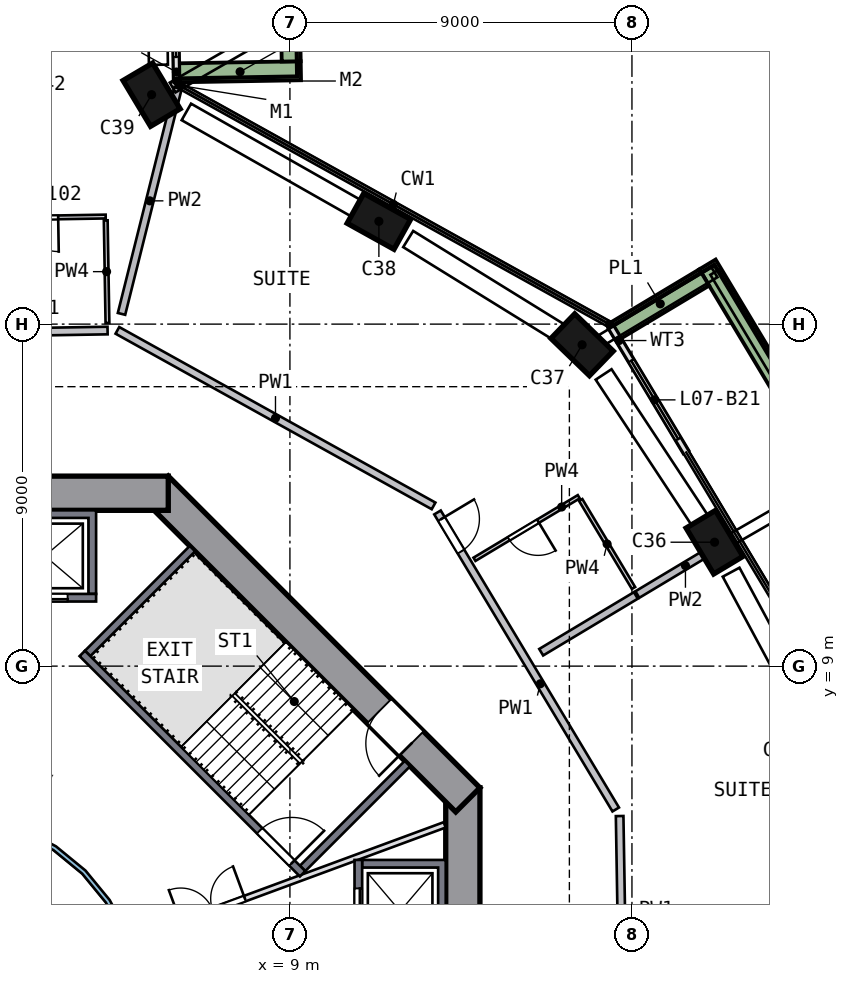
"""IFC4 building model, lengths in metres.
Left out: names, types, materials, properties, quantities, classifications, styles, units other than length and angle.
Written with IfcOpenShell. Run it as: python <this file> out.ifc"""

import sys

from ifc_helpers import new_model, si_unit, direction, frame, frame_2d, origin, origin_2d, place, context, subcontext, project, spatial, polyline, rectangle, outline, extrude, element, fill, save


model = new_model("IFC4")
c1 = context("Model", 3, precision=1e-05, world=origin(), true_north=direction((0.0, 1.0)))
c2 = subcontext(c1, "Body", "Model", "MODEL_VIEW")
j1 = project(units=[si_unit("LENGTHUNIT", "METRE"), si_unit("PLANEANGLEUNIT", "RADIAN")], contexts=[c1])
p1 = place(None, origin())
s1 = spatial("IfcSite", under=j1, at=p1, CompositionType="ELEMENT")
p2 = place(p1, origin())
s2 = spatial("IfcBuilding", under=s1, at=p2, CompositionType="ELEMENT")
p3 = place(p2, frame((0.0, 0.0, 39.0)))
s3 = spatial("IfcBuildingStorey", under=s2, at=p3, CompositionType="ELEMENT", Elevation=39.0)
p4 = place(p3, frame((20.245, 12.145, 0.0), z_axis=(-0.058634587, 0.095823061, 0.993669928), x_axis=(-0.511428467, 0.851951728, -0.112335108)))
e1 = element("IfcColumn", 1, at=p4, inside=s3, PredefinedType="COLUMN", context=c2, shape_type="SweptSolid", body=[
    extrude(rectangle(XDim=1.4, YDim=0.9, at=origin_2d()), origin(), (0.0, 0.0, 1.0), 3.21),
])
p5 = place(p3, frame((16.789, 17.361, 0.0), z_axis=(-0.08325007, 0.079220615, 0.993374813), x_axis=(0.713782466, -0.690875568, 0.114915364)))
e2 = element("IfcColumn", 2, at=p5, inside=s3, PredefinedType="COLUMN", context=c2, shape_type="SweptSolid", body=[
    extrude(rectangle(XDim=1.4, YDim=0.9, at=origin_2d()), origin(), (0.0, 0.0, 1.0), 3.211),
])
p6 = place(p3, frame((11.46, 20.64, 0.0), z_axis=(-0.098637311, 0.053691551, 0.99367394), x_axis=(-0.868690978, 0.482457023, -0.112299622)))
e3 = element("IfcColumn", 3, at=p6, inside=s3, PredefinedType="COLUMN", context=c2, shape_type="SweptSolid", body=[
    extrude(rectangle(XDim=1.4, YDim=0.9, at=origin_2d()), origin(), (0.0, 0.0, 1.0), 3.21),
])
p7 = place(p3, frame((5.499, 24.007, 0.0), z_axis=(-0.114391427, 0.025234521, 0.99311521), x_axis=(0.506584299, -0.858455681, 0.080163528)))
e4 = element("IfcColumn", 4, at=p7, inside=s3, PredefinedType="COLUMN", context=c2, shape_type="SweptSolid", body=[
    extrude(rectangle(XDim=1.4, YDim=0.9, at=origin_2d()), origin(), (0.0, 0.0, 1.0), 3.212),
])
p8 = place(p3, frame((13.55, -5.799, 0.0), z_axis=(0.0, 0.0, 1.0), x_axis=(0.0, 1.0, 0.0)))
e5 = element("IfcWall", 5, at=p8, inside=s3, PredefinedType="SHEAR", context=c2, shape_type="SweptSolid", body=[
    extrude(rectangle(XDim=11.598, YDim=0.9, at=frame_2d((5.799, 0.0))), origin(), (0.0, 0.0, 1.0), 3.5),
])
p9 = place(p8, frame((4.899, 0.0, 0.0)))
e6 = element("IfcOpeningElement", 6, at=p9, cuts=e5, PredefinedType="OPENING", context=c2, shape_type="SweptSolid", body=[
    extrude(rectangle(XDim=1.8, YDim=2.1, at=frame_2d((0.9, 1.05))), frame((0.0, 0.46, 0.0), z_axis=(0.0, -1.0, 0.0), x_axis=(1.0, 0.0, 0.0)), (0.0, 0.0, 1.0), 0.92),
])
p10 = place(p3, frame((13.682, 5.481, 0.0), z_axis=(0.0, 0.0, 1.0), x_axis=(-0.707106781, 0.707106781, 0.0)))
e7 = element("IfcWall", 7, at=p10, inside=s3, PredefinedType="SHEAR", context=c2, shape_type="SweptSolid", body=[
    extrude(rectangle(XDim=11.598, YDim=0.9, at=frame_2d((5.799, 0.0))), origin(), (0.0, 0.0, 1.0), 3.5),
])
p11 = place(p10, frame((2.099, 0.0, 0.0)))
e8 = element("IfcOpeningElement", 8, at=p11, cuts=e7, PredefinedType="OPENING", context=c2, shape_type="SweptSolid", body=[
    extrude(rectangle(XDim=1.2, YDim=2.1, at=frame_2d((0.6, 1.05))), frame((0.0, 0.46, 0.0), z_axis=(0.0, -1.0, 0.0), x_axis=(1.0, 0.0, 0.0)), (0.0, 0.0, 1.0), 0.92),
])
p12 = place(p3, frame((5.799, 13.55, 0.0), z_axis=(0.0, 0.0, 1.0), x_axis=(-1.0, 0.0, 0.0)))
e9 = element("IfcWall", 9, at=p12, inside=s3, PredefinedType="SHEAR", context=c2, shape_type="SweptSolid", body=[
    extrude(rectangle(XDim=11.598, YDim=0.9, at=frame_2d((5.799, 0.0))), origin(), (0.0, 0.0, 1.0), 3.5),
])
p13 = place(p12, frame((4.899, 0.0, 0.0)))
e10 = element("IfcOpeningElement", 10, at=p13, cuts=e9, PredefinedType="OPENING", context=c2, shape_type="SweptSolid", body=[
    extrude(rectangle(XDim=1.8, YDim=2.1, at=frame_2d((0.9, 1.05))), frame((0.0, 0.46, 0.0), z_axis=(0.0, -1.0, 0.0), x_axis=(1.0, 0.0, 0.0)), (0.0, 0.0, 1.0), 0.92),
])
p14 = place(p3, frame((6.017, 24.433, 0.0), z_axis=(0.0, 0.0, 1.0), x_axis=(-0.016793497, 0.999858979, 0.0)))
e11 = element("IfcWall", 11, at=p14, inside=s3, PredefinedType="SOLIDWALL", context=c2, shape_type="SweptSolid", body=[
    extrude(rectangle(XDim=3.402, YDim=0.15, at=frame_2d((1.701, 0.0))), origin(), (0.0, 0.0, 1.0), 2.425),
])
p15 = place(p14, frame((0.602, 0.0, 0.0)))
e12 = element("IfcOpeningElement", 12, at=p15, cuts=e11, PredefinedType="OPENING", context=c2, shape_type="SweptSolid", body=[
    extrude(rectangle(XDim=2.4, YDim=2.4, at=frame_2d((1.2, 1.2))), frame((0.0, 0.085, 0.0), z_axis=(0.0, -1.0, 0.0), x_axis=(1.0, 0.0, 0.0)), (0.0, 0.0, 1.0), 0.17),
])
p16 = place(p3, frame((19.422, 14.635, 0.0), z_axis=(0.0, 0.0, 1.0), x_axis=(-0.514430336, 0.857532174, 0.0)))
e13 = element("IfcWall", 13, at=p16, inside=s3, PredefinedType="SOLIDWALL", context=c2, shape_type="SweptSolid", body=[
    extrude(rectangle(XDim=3.842, YDim=0.15, at=frame_2d((1.921, 0.0))), origin(), (0.0, 0.0, 1.0), 2.425),
])
p17 = place(p16, frame((0.4, 0.0, 0.0)))
e14 = element("IfcOpeningElement", 14, at=p17, cuts=e13, PredefinedType="OPENING", context=c2, shape_type="SweptSolid", body=[
    extrude(rectangle(XDim=2.4, YDim=2.4, at=frame_2d((1.2, 1.2))), frame((0.0, 0.085, 0.0), z_axis=(0.0, -1.0, 0.0), x_axis=(1.0, 0.0, 0.0)), (0.0, 0.0, 1.0), 0.17),
])
p18 = place(p3, frame((27.048, 7.803, 0.0), z_axis=(0.0, 0.0, 1.0), x_axis=(-0.514432966, 0.857530596, 0.0)))
e15 = element("IfcWall", 15, at=p18, inside=s3, PredefinedType="SOLIDWALL", context=c2, shape_type="SweptSolid", body=[
    extrude(rectangle(XDim=13.723, YDim=0.5, at=frame_2d((6.862, 0.0))), origin(), (0.0, 0.0, 1.0), 0.7),
])
p19 = place(p3, frame((19.902, 19.228, 0.0), z_axis=(0.0, 0.0, 1.0), x_axis=(-0.857532831, -0.514429241, 0.0)))
e16 = element("IfcWall", 16, at=p19, inside=s3, PredefinedType="SOLIDWALL", context=c2, shape_type="SweptSolid", body=[
    extrude(rectangle(XDim=2.699, YDim=0.5, at=frame_2d((1.35, 0.0))), origin(), (0.0, 0.0, 1.0), 0.7),
])
p20 = place(p3, frame((6.089, 24.614, 0.0), z_axis=(0.0, 0.0, 1.0), x_axis=(0.999859055, 0.016788963, 0.0)))
e17 = element("IfcWall", 17, at=p20, inside=s3, PredefinedType="SOLIDWALL", context=c2, shape_type="SweptSolid", body=[
    extrude(rectangle(XDim=3.199, YDim=0.5, at=frame_2d((1.6, 0.0))), origin(), (0.0, 0.0, 1.0), 0.7),
])
p21 = place(p3, frame((9.034, 24.913, 0.0), z_axis=(0.0, 0.0, 1.0), x_axis=(-0.016763742, 0.999859479, 0.0)))
e18 = element("IfcWall", 18, at=p21, inside=s3, PredefinedType="SOLIDWALL", context=c2, shape_type="SweptSolid", body=[
    extrude(rectangle(XDim=16.617, YDim=0.5, at=frame_2d((8.309, 0.0))), origin(), (0.0, 0.0, 1.0), 0.7),
])
p22 = place(p3, origin())
e19 = element("IfcWall", 19, at=p22, inside=s3, PredefinedType="SOLIDWALL", context=c2, shape_type="SweptSolid", body=[
    extrude(outline(polyline([(13.1, 3.9), (13.1, 1.2), (10.9, 1.2), (10.9, 1.4), (12.9, 1.4), (12.9, 3.7), (10.9, 3.7), (10.9, 3.9), (13.1, 3.9)])), origin(), (0.0, 0.0, 1.0), 3.19),
])
p23 = place(p3, frame((10.8, 1.2, 0.0), z_axis=(0.0, 0.0, 1.0), x_axis=(0.0, 1.0, 0.0)))
e20 = element("IfcWall", 20, at=p23, inside=s3, PredefinedType="SOLIDWALL", context=c2, shape_type="SweptSolid", body=[
    extrude(rectangle(XDim=2.7, YDim=0.2, at=frame_2d((1.35, 0.0))), origin(), (0.0, 0.0, 1.0), 3.19),
])
p24 = place(p23, frame((0.75, 0.0, 0.0)))
e21 = element("IfcOpeningElement", 21, at=p24, cuts=e20, PredefinedType="OPENING", context=c2, shape_type="SweptSolid", body=[
    extrude(rectangle(XDim=1.2, YDim=2.1, at=frame_2d((0.6, 1.05))), frame((0.0, 0.11, 0.0), z_axis=(0.0, -1.0, 0.0), x_axis=(1.0, 0.0, 0.0)), (0.0, 0.0, 1.0), 0.22),
])
p25 = place(p3, origin())
e22 = element("IfcWall", 22, at=p25, inside=s3, PredefinedType="SOLIDWALL", context=c2, shape_type="SweptSolid", body=[
    extrude(outline(polyline([(3.9, 13.1), (3.9, 10.9), (3.7, 10.9), (3.7, 12.9), (1.4, 12.9), (1.4, 10.9), (1.2, 10.9), (1.2, 13.1), (3.9, 13.1)])), origin(), (0.0, 0.0, 1.0), 3.19),
])
p26 = place(p3, frame((1.2, 10.8, 0.0), z_axis=(0.0, 0.0, 1.0), x_axis=(1.0, 0.0, 0.0)))
e23 = element("IfcWall", 23, at=p26, inside=s3, PredefinedType="SOLIDWALL", context=c2, shape_type="SweptSolid", body=[
    extrude(rectangle(XDim=2.7, YDim=0.2, at=frame_2d((1.35, 0.0))), origin(), (0.0, 0.0, 1.0), 3.19),
])
p27 = place(p26, frame((0.75, 0.0, 0.0)))
e24 = element("IfcOpeningElement", 24, at=p27, cuts=e23, PredefinedType="OPENING", context=c2, shape_type="SweptSolid", body=[
    extrude(rectangle(XDim=1.2, YDim=2.1, at=frame_2d((0.6, 1.05))), frame((0.0, 0.11, 0.0), z_axis=(0.0, -1.0, 0.0), x_axis=(1.0, 0.0, 0.0)), (0.0, 0.0, 1.0), 0.22),
])
p28 = place(p3, frame((3.535, 9.334, 0.0), z_axis=(0.0, 0.0, 1.0), x_axis=(0.707106781, -0.707106781, 0.0)))
e25 = element("IfcWall", 25, at=p28, inside=s3, PredefinedType="SOLIDWALL", context=c2, shape_type="SweptSolid", body=[
    extrude(rectangle(XDim=8.2, YDim=0.2, at=frame_2d((4.1, 0.0))), origin(), (0.0, 0.0, 1.0), 3.19),
])
p29 = place(p28, frame((6.6, 0.0, 0.0)))
e26 = element("IfcOpeningElement", 26, at=p29, cuts=e25, PredefinedType="OPENING", context=c2, shape_type="SweptSolid", body=[
    extrude(rectangle(XDim=1.2, YDim=2.1, at=frame_2d((0.6, 1.05))), frame((0.0, 0.11, 0.0), z_axis=(0.0, -1.0, 0.0), x_axis=(1.0, 0.0, 0.0)), (0.0, 0.0, 1.0), 0.22),
])
for number, where, z_axis, x_axis in (
    (27, (9.334, 3.677, 0.0), (0.0, 0.0, 1.0), (0.707, 0.707, 0.0)),
    (28, (3.677, 9.334, 0.0), (0.0, 0.0, 1.0), (0.707, 0.707, 0.0)),
):
    element("IfcWall", number, at=place(p3, frame(where, z_axis=z_axis, x_axis=x_axis)), inside=s3, PredefinedType="SOLIDWALL", context=c2, shape_type="SweptSolid", body=[
        extrude(rectangle(XDim=3.9, YDim=0.2, at=frame_2d((1.95, 0.0))), origin(), (0.0, 0.0, 1.0), 3.19),
    ])
p30 = place(p3, frame((4.813, 1.776, 0.0), z_axis=(0.0, 0.0, 1.0), x_axis=(0.93819293, 0.346112737, 0.0)))
e29 = element("IfcWall", 29, at=p30, inside=s3, PredefinedType="PARTITIONING", context=c2, shape_type="SweptSolid", body=[
    extrude(rectangle(XDim=8.803, YDim=0.15, at=frame_2d((4.402, 0.0))), origin(), (0.0, 0.0, 1.0), 3.19),
])
p31 = place(p30, frame((1.4, 0.0, 0.0)))
e30 = element("IfcOpeningElement", 30, at=p31, cuts=e29, PredefinedType="OPENING", context=c2, shape_type="SweptSolid", body=[
    extrude(rectangle(XDim=1.8, YDim=2.1, at=frame_2d((0.9, 1.05))), frame((0.0, 0.085, 0.0), z_axis=(0.0, -1.0, 0.0), x_axis=(1.0, 0.0, 0.0)), (0.0, 0.0, 1.0), 0.17),
])
p32 = place(p3, origin())
e31 = element("IfcWall", 31, at=p32, inside=s3, PredefinedType="SOLIDWALL", context=c2, shape_type="SweptSolid", body=[
    extrude(outline(polyline([(5.021, -0.999), (4.73, -1.959), (4.257, -2.844), (3.62, -3.62), (2.844, -4.257), (1.959, -4.73), (0.999, -5.021), (0.0, -5.12), (-0.999, -5.021), (-1.959, -4.73), (-2.844, -4.257), (-3.62, -3.62), (-4.257, -2.844), (-4.73, -1.959), (-5.021, -0.999), (-5.12, 0.0), (-5.021, 0.999), (-4.73, 1.959), (-4.257, 2.844), (-3.62, 3.62), (-2.844, 4.257), (-1.959, 4.73), (-0.999, 5.021), (0.0, 5.12), (0.999, 5.021), (1.959, 4.73), (2.844, 4.257), (3.62, 3.62), (4.257, 2.844), (4.73, 1.959), (5.021, 0.999), (5.12, 0.0), (5.021, -0.999)]), holes=[polyline([(4.904, 0.976), (4.619, 1.913), (4.157, 2.778), (3.535, 3.535), (2.778, 4.157), (1.913, 4.619), (0.976, 4.904), (0.0, 5.0), (-0.976, 4.904), (-1.913, 4.619), (-2.778, 4.157), (-3.535, 3.535), (-4.157, 2.778), (-4.619, 1.913), (-4.904, 0.976), (-5.0, 0.0), (-4.904, -0.976), (-4.619, -1.913), (-4.157, -2.778), (-3.535, -3.535), (-2.778, -4.157), (-1.913, -4.619), (-0.976, -4.904), (0.0, -5.0), (0.976, -4.904), (1.913, -4.619), (2.778, -4.157), (3.535, -3.535), (4.157, -2.778), (4.619, -1.913), (4.904, -0.976), (5.0, 0.0), (4.904, 0.976)])]), origin(), (0.0, 0.0, 1.0), 3.19),
])
p33 = place(p3, frame((4.202, 17.831, 0.0), z_axis=(0.0, 0.0, 1.0), x_axis=(-0.999860021, -0.016731355, 0.0)))
e32 = element("IfcWall", 32, at=p33, inside=s3, PredefinedType="SOLIDWALL", context=c2, shape_type="SweptSolid", body=[
    extrude(rectangle(XDim=3.4, YDim=0.2, at=frame_2d((1.7, 0.0))), origin(), (0.0, 0.0, 1.0), 3.19),
])
p34 = place(p3, frame((12.78, 13.216, 0.0), z_axis=(0.0, 0.0, 1.0), x_axis=(-0.874284317, 0.485414188, 0.0)))
e33 = element("IfcWall", 33, at=p34, inside=s3, PredefinedType="SOLIDWALL", context=c2, shape_type="SweptSolid", body=[
    extrude(rectangle(XDim=9.516, YDim=0.2, at=frame_2d((4.758, 0.0))), origin(), (0.0, 0.0, 1.0), 3.19),
])
p35 = place(p3, frame((12.884, 13.044, 0.0), z_axis=(0.0, 0.0, 1.0), x_axis=(0.514452429, -0.85751892, 0.0)))
e34 = element("IfcWall", 34, at=p35, inside=s3, PredefinedType="SOLIDWALL", context=c2, shape_type="SweptSolid", body=[
    extrude(rectangle(XDim=9.115, YDim=0.2, at=frame_2d((4.558, 0.0))), origin(), (0.0, 0.0, 1.0), 3.19),
])
p36 = place(p35, frame((0.2, 0.0, 0.0)))
e35 = element("IfcOpeningElement", 35, at=p36, cuts=e34, PredefinedType="OPENING", context=c2, shape_type="SweptSolid", body=[
    extrude(rectangle(XDim=1.0, YDim=2.1, at=frame_2d((0.5, 1.05))), frame((0.0, 0.11, 0.0), z_axis=(0.0, -1.0, 0.0), x_axis=(1.0, 0.0, 0.0)), (0.0, 0.0, 1.0), 0.22),
])
p37 = place(p3, frame((17.676, 5.055, 0.0), z_axis=(0.0, 0.0, 1.0), x_axis=(0.016772206, -0.999859337, 0.0)))
e36 = element("IfcWall", 36, at=p37, inside=s3, PredefinedType="SOLIDWALL", context=c2, shape_type="SweptSolid", body=[
    extrude(rectangle(XDim=9.316, YDim=0.2, at=frame_2d((4.658, 0.0))), origin(), (0.0, 0.0, 1.0), 3.19),
])
p38 = place(p37, frame((5.15, 0.0, 0.0)))
e37 = element("IfcOpeningElement", 37, at=p38, cuts=e36, PredefinedType="OPENING", context=c2, shape_type="SweptSolid", body=[
    extrude(rectangle(XDim=1.0, YDim=2.1, at=frame_2d((0.5, 1.05))), frame((0.0, 0.11, 0.0), z_axis=(0.0, -1.0, 0.0), x_axis=(1.0, 0.0, 0.0)), (0.0, 0.0, 1.0), 0.22),
])
p39 = place(p3, frame((6.056, 24.218, 0.0), z_axis=(0.0, 0.0, 1.0), x_axis=(-0.242629305, -0.970119075, 0.0)))
e38 = element("IfcWall", 38, at=p39, inside=s3, PredefinedType="SOLIDWALL", context=c2, shape_type="SweptSolid", body=[
    extrude(rectangle(XDim=6.132, YDim=0.2, at=frame_2d((3.066, 0.0))), origin(), (0.0, 0.0, 1.0), 3.19),
])
p40 = place(p3, frame((15.612, 9.366, 0.0), z_axis=(0.0, 0.0, 1.0), x_axis=(0.857522588, 0.514446316, 0.0)))
e39 = element("IfcWall", 39, at=p40, inside=s3, PredefinedType="SOLIDWALL", context=c2, shape_type="SweptSolid", body=[
    extrude(rectangle(XDim=2.905, YDim=0.2, at=frame_2d((1.452, 0.0))), origin(), (0.0, 0.0, 1.0), 3.19),
])
p41 = place(p3, frame((18.142, 10.884, 0.0), z_axis=(0.0, 0.0, 1.0), x_axis=(0.857544003, 0.514410618, 0.0)))
e40 = element("IfcWall", 40, at=p41, inside=s3, PredefinedType="SOLIDWALL", context=c2, shape_type="SweptSolid", body=[
    extrude(rectangle(XDim=2.952, YDim=0.2, at=frame_2d((1.476, 0.0))), origin(), (0.0, 0.0, 1.0), 3.19),
])
p42 = place(p3, frame((4.152, 20.831, 0.0), z_axis=(0.0, 0.0, 1.0), x_axis=(-0.999859141, -0.01678384, 0.0)))
e41 = element("IfcWall", 41, at=p42, inside=s3, PredefinedType="PARTITIONING", context=c2, shape_type="SweptSolid", body=[
    extrude(rectangle(XDim=3.2, YDim=0.1, at=frame_2d((1.6, 0.0))), origin(), (0.0, 0.0, 1.0), 3.19),
])
p43 = place(p42, frame((1.25, 0.0, 0.0)))
e42 = element("IfcOpeningElement", 42, at=p43, cuts=e41, PredefinedType="OPENING", context=c2, shape_type="SweptSolid", body=[
    extrude(rectangle(XDim=0.9, YDim=2.1, at=frame_2d((0.45, 1.05))), frame((0.0, 0.06, 0.0), z_axis=(0.0, -1.0, 0.0), x_axis=(1.0, 0.0, 0.0)), (0.0, 0.0, 1.0), 0.12),
])
p44 = place(p3, frame((4.153, 20.731, 0.0), z_axis=(0.0, 0.0, 1.0), x_axis=(0.016729141, -0.999860058, 0.0)))
e43 = element("IfcWall", 43, at=p44, inside=s3, PredefinedType="PARTITIONING", context=c2, shape_type="SweptSolid", body=[
    extrude(rectangle(XDim=2.7, YDim=0.1, at=frame_2d((1.35, 0.0))), origin(), (0.0, 0.0, 1.0), 3.19),
])
p45 = place(p3, frame((16.601, 13.457, 0.0), z_axis=(0.0, 0.0, 1.0), x_axis=(-0.857526582, -0.514439657, 0.0)))
e44 = element("IfcWall", 44, at=p45, inside=s3, PredefinedType="PARTITIONING", context=c2, shape_type="SweptSolid", body=[
    extrude(rectangle(XDim=3.2, YDim=0.1, at=frame_2d((1.6, 0.0))), origin(), (0.0, 0.0, 1.0), 3.19),
])
p46 = place(p45, frame((1.25, 0.0, 0.0)))
e45 = element("IfcOpeningElement", 45, at=p46, cuts=e44, PredefinedType="OPENING", context=c2, shape_type="SweptSolid", body=[
    extrude(rectangle(XDim=0.9, YDim=2.1, at=frame_2d((0.45, 1.05))), frame((0.0, 0.06, 0.0), z_axis=(0.0, -1.0, 0.0), x_axis=(1.0, 0.0, 0.0)), (0.0, 0.0, 1.0), 0.12),
])
p47 = place(p3, frame((16.652, 13.372, 0.0), z_axis=(0.0, 0.0, 1.0), x_axis=(0.514402672, -0.857548769, 0.0)))
e46 = element("IfcWall", 46, at=p47, inside=s3, PredefinedType="PARTITIONING", context=c2, shape_type="SweptSolid", body=[
    extrude(rectangle(XDim=2.7, YDim=0.1, at=frame_2d((1.35, 0.0))), origin(), (0.0, 0.0, 1.0), 3.19),
])
p48 = place(p15, origin())
e47 = element("IfcDoor", 47, at=p48, inside=s3, OperationType="SLIDING_TO_LEFT", PredefinedType="DOOR", context=c2, shape_type="SweptSolid", body=[
    extrude(rectangle(XDim=2.4, YDim=2.4, at=frame_2d((1.2, 1.2))), frame((0.0, 0.025, 0.0), z_axis=(0.0, -1.0, 0.0), x_axis=(1.0, 0.0, 0.0)), (0.0, 0.0, 1.0), 0.05),
])
fill(e12, e47)
p49 = place(p17, origin())
e48 = element("IfcDoor", 48, at=p49, inside=s3, OperationType="SLIDING_TO_RIGHT", PredefinedType="DOOR", context=c2, shape_type="SweptSolid", body=[
    extrude(rectangle(XDim=2.4, YDim=2.4, at=frame_2d((1.2, 1.2))), frame((0.0, 0.025, 0.0), z_axis=(0.0, -1.0, 0.0), x_axis=(1.0, 0.0, 0.0)), (0.0, 0.0, 1.0), 0.05),
])
fill(e14, e48)
p50 = place(p24, origin())
e49 = element("IfcDoor", 49, at=p50, inside=s3, OperationType="DOUBLE_DOOR_SLIDING", PredefinedType="DOOR", context=c2, shape_type="SweptSolid", body=[
    extrude(rectangle(XDim=1.2, YDim=2.1, at=frame_2d((0.6, 1.05))), frame((0.0, 0.025, 0.0), z_axis=(0.0, -1.0, 0.0), x_axis=(1.0, 0.0, 0.0)), (0.0, 0.0, 1.0), 0.05),
])
fill(e21, e49)
p51 = place(p27, origin())
e50 = element("IfcDoor", 50, at=p51, inside=s3, OperationType="DOUBLE_DOOR_SLIDING", PredefinedType="DOOR", context=c2, shape_type="SweptSolid", body=[
    extrude(rectangle(XDim=1.2, YDim=2.1, at=frame_2d((0.6, 1.05))), frame((0.0, 0.025, 0.0), z_axis=(0.0, -1.0, 0.0), x_axis=(1.0, 0.0, 0.0)), (0.0, 0.0, 1.0), 0.05),
])
fill(e24, e50)
p52 = place(p29, origin())
e51 = element("IfcDoor", 51, at=p52, inside=s3, OperationType="SINGLE_SWING_RIGHT", PredefinedType="DOOR", context=c2, shape_type="SweptSolid", body=[
    extrude(rectangle(XDim=1.2, YDim=2.1, at=frame_2d((0.6, 1.05))), frame((0.0, 0.025, 0.0), z_axis=(0.0, -1.0, 0.0), x_axis=(1.0, 0.0, 0.0)), (0.0, 0.0, 1.0), 0.05),
])
fill(e26, e51)
p53 = place(p11, origin())
e52 = element("IfcDoor", 52, at=p53, inside=s3, OperationType="SINGLE_SWING_LEFT", PredefinedType="DOOR", context=c2, shape_type="SweptSolid", body=[
    extrude(rectangle(XDim=1.2, YDim=2.1, at=frame_2d((0.6, 1.05))), frame((0.0, 0.025, 0.0), z_axis=(0.0, -1.0, 0.0), x_axis=(1.0, 0.0, 0.0)), (0.0, 0.0, 1.0), 0.05),
])
fill(e8, e52)
p54 = place(p31, origin())
e53 = element("IfcDoor", 53, at=p54, inside=s3, OperationType="DOUBLE_DOOR_SINGLE_SWING", PredefinedType="DOOR", context=c2, shape_type="SweptSolid", body=[
    extrude(rectangle(XDim=1.8, YDim=2.1, at=frame_2d((0.9, 1.05))), frame((0.0, 0.025, 0.0), z_axis=(0.0, -1.0, 0.0), x_axis=(1.0, 0.0, 0.0)), (0.0, 0.0, 1.0), 0.05),
])
fill(e30, e53)
p55 = place(p43, origin())
e54 = element("IfcDoor", 54, at=p55, inside=s3, OperationType="SINGLE_SWING_LEFT", PredefinedType="DOOR", context=c2, shape_type="SweptSolid", body=[
    extrude(rectangle(XDim=0.9, YDim=2.1, at=frame_2d((0.45, 1.05))), frame((0.0, 0.025, 0.0), z_axis=(0.0, -1.0, 0.0), x_axis=(1.0, 0.0, 0.0)), (0.0, 0.0, 1.0), 0.05),
])
fill(e42, e54)
p56 = place(p36, origin())
e55 = element("IfcDoor", 55, at=p56, inside=s3, OperationType="SINGLE_SWING_LEFT", PredefinedType="DOOR", context=c2, shape_type="SweptSolid", body=[
    extrude(rectangle(XDim=1.0, YDim=2.1, at=frame_2d((0.5, 1.05))), frame((0.0, 0.025, 0.0), z_axis=(0.0, -1.0, 0.0), x_axis=(1.0, 0.0, 0.0)), (0.0, 0.0, 1.0), 0.05),
])
fill(e35, e55)
p57 = place(p46, origin())
e56 = element("IfcDoor", 56, at=p57, inside=s3, OperationType="SINGLE_SWING_LEFT", PredefinedType="DOOR", context=c2, shape_type="SweptSolid", body=[
    extrude(rectangle(XDim=0.9, YDim=2.1, at=frame_2d((0.45, 1.05))), frame((0.0, 0.025, 0.0), z_axis=(0.0, -1.0, 0.0), x_axis=(1.0, 0.0, 0.0)), (0.0, 0.0, 1.0), 0.05),
])
fill(e45, e56)
save(model, sys.argv[1])
